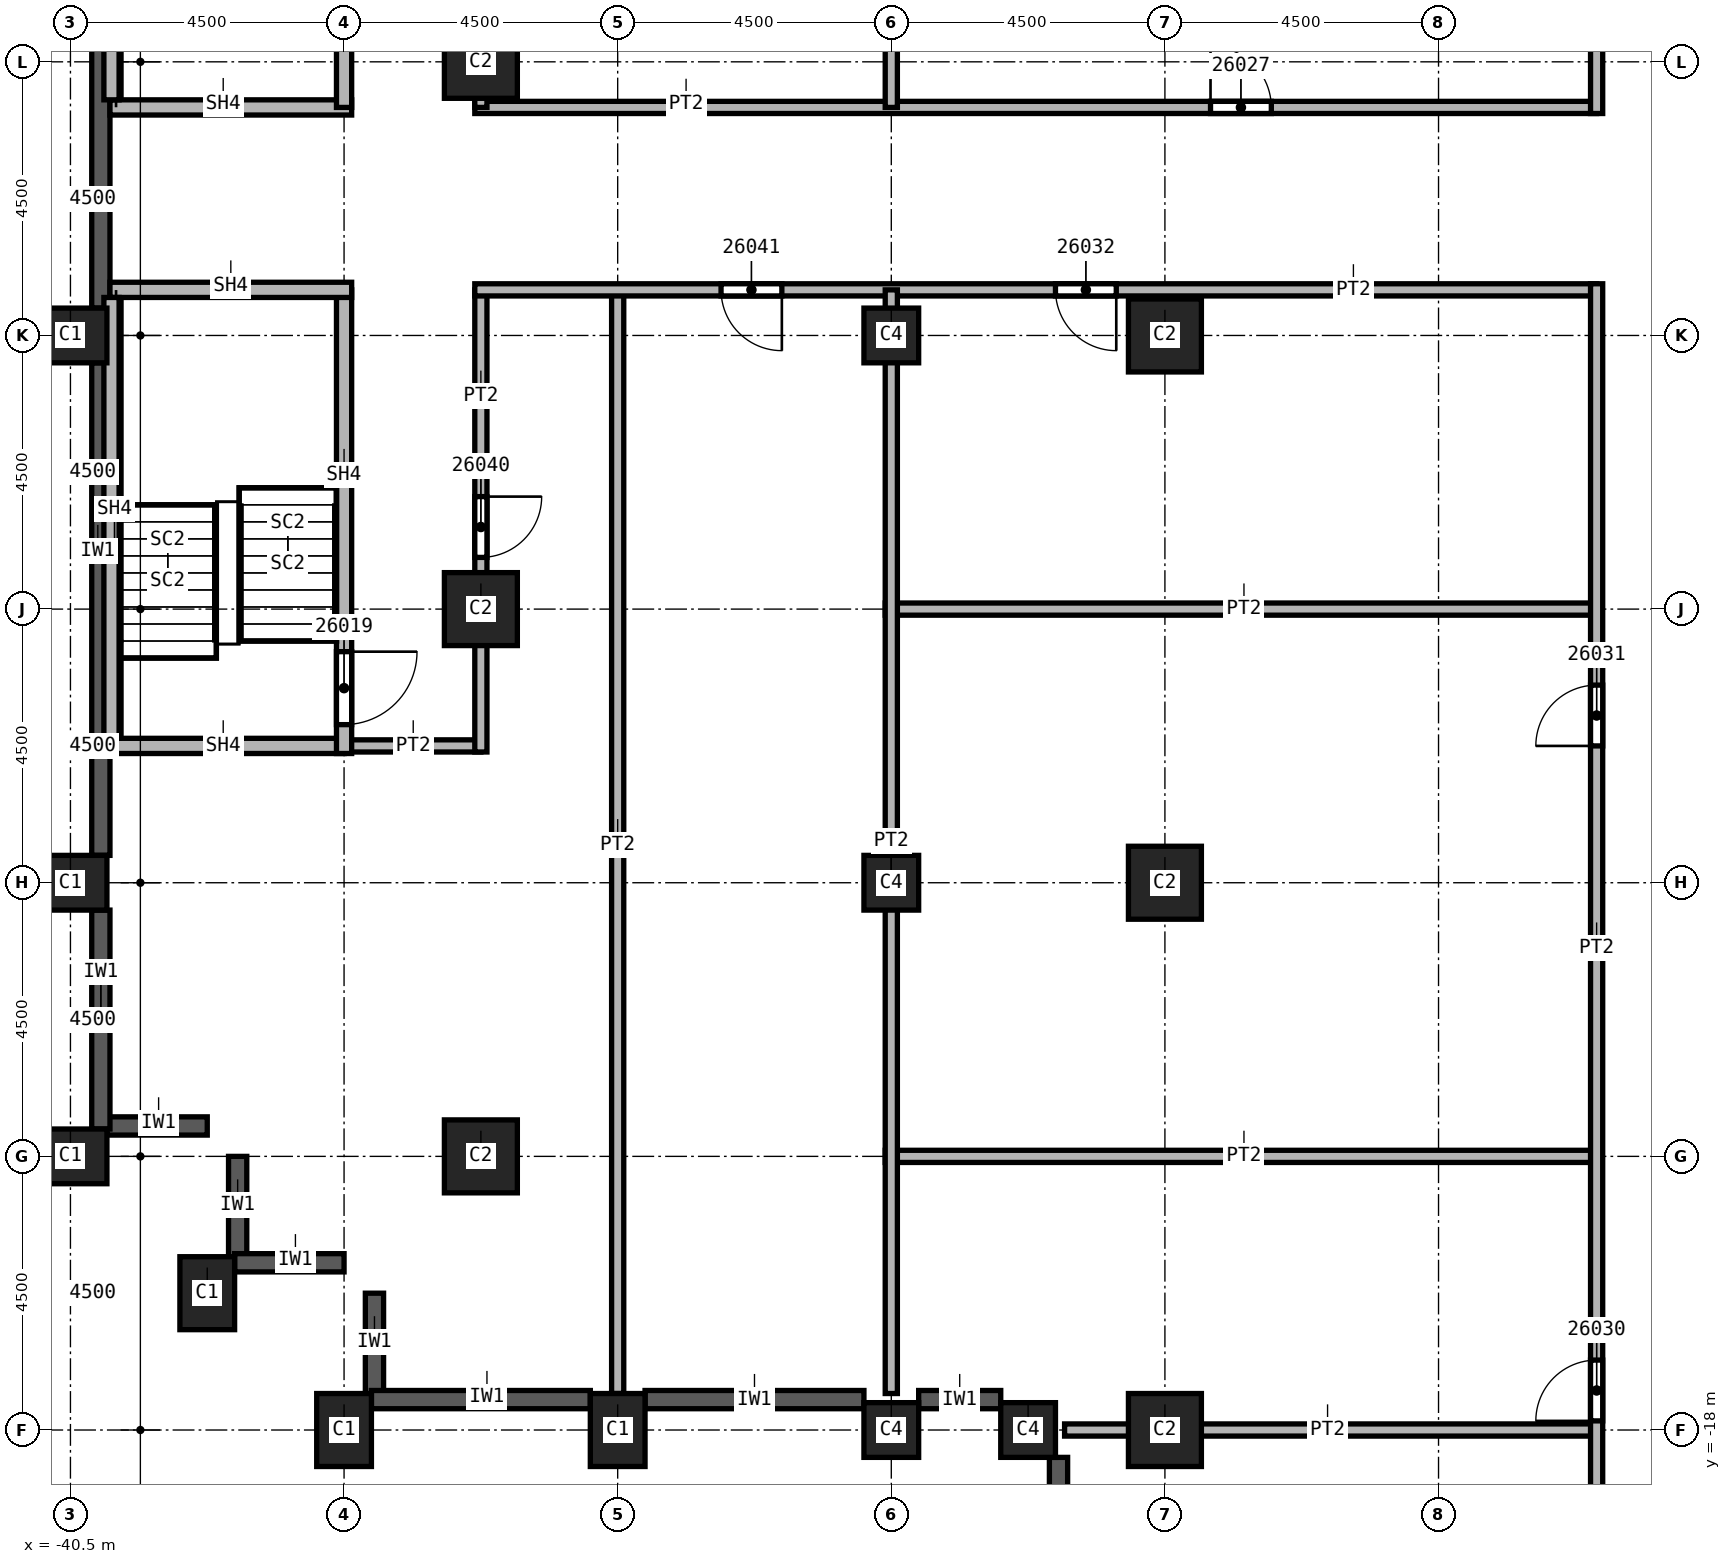
"""IFC4 building model, lengths in metres.
Left out: names, types, materials, properties, quantities, classifications, styles, units other than length and angle.
Written with IfcOpenShell. Run it as: python <this file> out.ifc"""

import sys

from ifc_helpers import new_model, si_unit, direction, frame, frame_2d, origin, origin_2d, place, context, subcontext, project, spatial, rectangle, extrude, element, fill, save


model = new_model("IFC4")
c1 = context("Model", 3, precision=1e-05, world=origin(), true_north=direction((0.0, 1.0)))
c2 = subcontext(c1, "Body", "Model", "MODEL_VIEW")
j1 = project(units=[si_unit("LENGTHUNIT", "METRE"), si_unit("PLANEANGLEUNIT", "RADIAN")], contexts=[c1])
p1 = place(None, origin())
s1 = spatial("IfcSite", under=j1, at=p1, CompositionType="ELEMENT")
p2 = place(p1, origin())
s2 = spatial("IfcBuilding", under=s1, at=p2, CompositionType="ELEMENT")
p3 = place(p2, frame((0.0, 0.0, 120.0)))
s3 = spatial("IfcBuildingStorey", under=s2, at=p3, CompositionType="ELEMENT", Elevation=120.0)
for number, where, z_axis, x_axis in (
    (1, (-40.5, 0.0, 0.0), (0.0, 0.0, 1.0), (0.0, 1.0, 0.0)),
    (2, (-40.5, -9.0, 0.0), (0.0, 0.0, 1.0), (0.0, 1.0, 0.0)),
    (3, (-40.5, -13.5, 0.0), (0.0, 0.0, 1.0), (0.0, 1.0, 0.0)),
    (4, (-38.25, -15.75, 0.0), (0.0, 0.0, 1.0), (1.0, 0.0, 0.0)),
    (5, (-31.5, -18.0, 0.0), (0.0, 0.0, 1.0), (1.0, 0.0, 0.0)),
    (6, (-36.0, -18.0, 0.0), (0.0, 0.0, 1.0), (1.0, 0.0, 0.0)),
):
    element("IfcColumn", number, at=place(p3, frame(where, z_axis=z_axis, x_axis=x_axis)), inside=s3, PredefinedType="COLUMN", context=c2, shape_type="SweptSolid", body=[
        extrude(rectangle(XDim=0.9, YDim=1.2, at=origin_2d()), origin(), (0.0, 0.0, 1.0), 5.7),
    ])
for number, where, z_axis, x_axis in (
    (7, (-33.75, 4.5, 0.0), (0.0, 0.0, 1.0), (1.0, 0.0, 0.0)),
    (8, (-33.75, -4.5, 0.0), (0.0, 0.0, 1.0), (1.0, 0.0, 0.0)),
    (9, (-33.75, -13.5, 0.0), (0.0, 0.0, 1.0), (1.0, 0.0, 0.0)),
    (10, (-22.5, 0.0, 0.0), (0.0, 0.0, 1.0), (1.0, 0.0, 0.0)),
    (11, (-22.5, -9.0, 0.0), (0.0, 0.0, 1.0), (1.0, 0.0, 0.0)),
    (12, (-22.5, -18.0, 0.0), (0.0, 0.0, 1.0), (1.0, 0.0, 0.0)),
):
    element("IfcColumn", number, at=place(p3, frame(where, z_axis=z_axis, x_axis=x_axis)), inside=s3, PredefinedType="COLUMN", context=c2, shape_type="SweptSolid", body=[
        extrude(rectangle(XDim=1.2, YDim=1.2, at=origin_2d()), origin(), (0.0, 0.0, 1.0), 5.7),
    ])
for number, where, z_axis, x_axis in (
    (13, (-27.0, 0.0, 0.0), (0.0, 0.0, 1.0), (1.0, 0.0, 0.0)),
    (14, (-27.0, -9.0, 0.0), (0.0, 0.0, 1.0), (1.0, 0.0, 0.0)),
    (15, (-27.0, -18.0, 0.0), (0.0, 0.0, 1.0), (1.0, 0.0, 0.0)),
    (16, (-24.75, -18.0, 0.0), (0.0, 0.0, 1.0), (1.0, 0.0, 0.0)),
):
    element("IfcColumn", number, at=place(p3, frame(where, z_axis=z_axis, x_axis=x_axis)), inside=s3, PredefinedType="COLUMN", context=c2, shape_type="SweptSolid", body=[
        extrude(rectangle(XDim=0.9, YDim=0.9, at=origin_2d()), origin(), (0.0, 0.0, 1.0), 5.7),
    ])
p4 = place(p3, frame((-39.9, -13.0, 0.0), z_axis=(0.0, 0.0, 1.0), x_axis=(1.0, 0.0, 0.0)))
e17 = element("IfcWall", 17, at=p4, inside=s3, PredefinedType="SOLIDWALL", context=c2, shape_type="SweptSolid", body=[
    extrude(rectangle(XDim=1.65, YDim=0.3, at=frame_2d((0.825, 0.0))), origin(), (0.0, 0.0, 1.0), 5.1),
])
for number, where, z_axis, x_axis in (
    (18, (-37.75, -15.3, 0.0), (0.0, 0.0, 1.0), (0.0, 1.0, 0.0)),
    (19, (-37.8, -15.25, 0.0), (0.0, 0.0, 1.0), (1.0, 0.0, 0.0)),
    (20, (-35.5, -17.55, 0.0), (0.0, 0.0, 1.0), (0.0, 1.0, 0.0)),
):
    element("IfcWall", number, at=place(p3, frame(where, z_axis=z_axis, x_axis=x_axis)), inside=s3, PredefinedType="SOLIDWALL", context=c2, shape_type="SweptSolid", body=[
        extrude(rectangle(XDim=1.8, YDim=0.3, at=frame_2d((0.9, 0.0))), origin(), (0.0, 0.0, 1.0), 5.1),
    ])
for number, where, z_axis, x_axis in (
    (21, (-40.0, 8.55, 0.0), (0.0, 0.0, 1.0), (0.0, -1.0, 0.0)),
    (22, (-40.0, -0.45, 0.0), (0.0, 0.0, 1.0), (0.0, -1.0, 0.0)),
):
    element("IfcWall", number, at=place(p3, frame(where, z_axis=z_axis, x_axis=x_axis)), inside=s3, PredefinedType="SOLIDWALL", context=c2, shape_type="SweptSolid", body=[
        extrude(rectangle(XDim=8.1, YDim=0.3, at=frame_2d((4.05, 0.0))), origin(), (0.0, 0.0, 1.0), 5.1),
    ])
for number, where, z_axis, x_axis in (
    (23, (-40.0, -9.45, 0.0), (0.0, 0.0, 1.0), (0.0, -1.0, 0.0)),
    (24, (-35.55, -17.5, 0.0), (0.0, 0.0, 1.0), (1.0, 0.0, 0.0)),
    (25, (-31.05, -17.5, 0.0), (0.0, 0.0, 1.0), (1.0, 0.0, 0.0)),
):
    element("IfcWall", number, at=place(p3, frame(where, z_axis=z_axis, x_axis=x_axis)), inside=s3, PredefinedType="SOLIDWALL", context=c2, shape_type="SweptSolid", body=[
        extrude(rectangle(XDim=3.6, YDim=0.3, at=frame_2d((1.8, 0.0))), origin(), (0.0, 0.0, 1.0), 5.1),
    ])
p5 = place(p3, frame((-26.55, -17.5, 0.0), z_axis=(0.0, 0.0, 1.0), x_axis=(1.0, 0.0, 0.0)))
e26 = element("IfcWall", 26, at=p5, inside=s3, PredefinedType="SOLIDWALL", context=c2, shape_type="SweptSolid", body=[
    extrude(rectangle(XDim=1.35, YDim=0.3, at=frame_2d((0.675, 0.0))), origin(), (0.0, 0.0, 1.0), 5.1),
])
p6 = place(p3, frame((-24.25, -18.45, 0.0), z_axis=(0.0, 0.0, 1.0), x_axis=(0.0, -1.0, 0.0)))
e27 = element("IfcWall", 27, at=p6, inside=s3, PredefinedType="SOLIDWALL", context=c2, shape_type="SweptSolid", body=[
    extrude(rectangle(XDim=2.5, YDim=0.3, at=frame_2d((1.25, 0.0))), origin(), (0.0, 0.0, 1.0), 5.1),
])
p7 = place(p3, frame((-33.85, 3.75, 0.0), z_axis=(0.0, 0.0, 1.0), x_axis=(1.0, 0.0, 0.0)))
e28 = element("IfcWall", 28, at=p7, inside=s3, PredefinedType="PARTITIONING", context=c2, shape_type="SweptSolid", body=[
    extrude(rectangle(XDim=18.45, YDim=0.2, at=frame_2d((9.225, 0.0))), origin(), (0.0, 0.0, 1.0), 5.7),
])
p8 = place(p7, frame((12.1, 0.0, 0.0)))
e29 = element("IfcOpeningElement", 29, at=p8, cuts=e28, PredefinedType="OPENING", context=c2, shape_type="SweptSolid", body=[
    extrude(rectangle(XDim=1.0, YDim=2.1, at=frame_2d((0.5, 1.05))), frame((0.0, 0.1, 0.0), z_axis=(0.0, -1.0, 0.0), x_axis=(1.0, 0.0, 0.0)), (0.0, 0.0, 1.0), 0.2),
])
p9 = place(p3, frame((-33.75, -6.75, 0.0), z_axis=(0.0, 0.0, 1.0), x_axis=(-1.0, 0.0, 0.0)))
e30 = element("IfcWall", 30, at=p9, inside=s3, PredefinedType="PARTITIONING", context=c2, shape_type="SweptSolid", body=[
    extrude(rectangle(XDim=2.25, YDim=0.2, at=frame_2d((1.125, 0.0))), origin(), (0.0, 0.0, 1.0), 5.7),
])
p10 = place(p3, frame((-33.75, 0.75, 0.0), z_axis=(0.0, 0.0, 1.0), x_axis=(0.0, -1.0, 0.0)))
e31 = element("IfcWall", 31, at=p10, inside=s3, PredefinedType="PARTITIONING", context=c2, shape_type="SweptSolid", body=[
    extrude(rectangle(XDim=7.6, YDim=0.2, at=frame_2d((3.8, 0.0))), origin(), (0.0, 0.0, 1.0), 5.7),
])
p11 = place(p10, frame((3.4, 0.0, 0.0)))
e32 = element("IfcOpeningElement", 32, at=p11, cuts=e31, PredefinedType="OPENING", context=c2, shape_type="SweptSolid", body=[
    extrude(rectangle(XDim=1.0, YDim=2.1, at=frame_2d((0.5, 1.05))), frame((0.0, 0.1, 0.0), z_axis=(0.0, -1.0, 0.0), x_axis=(1.0, 0.0, 0.0)), (0.0, 0.0, 1.0), 0.2),
])
p12 = place(p3, frame((-33.75, 11.25, 0.0), z_axis=(0.0, 0.0, 1.0), x_axis=(0.0, -1.0, 0.0)))
e33 = element("IfcWall", 33, at=p12, inside=s3, PredefinedType="PARTITIONING", context=c2, shape_type="SweptSolid", body=[
    extrude(rectangle(XDim=7.5, YDim=0.2, at=frame_2d((3.75, 0.0))), origin(), (0.0, 0.0, 1.0), 5.7),
])
p13 = place(p3, frame((-31.5, 0.75, 0.0), z_axis=(0.0, 0.0, 1.0), x_axis=(0.0, -1.0, 0.0)))
e34 = element("IfcWall", 34, at=p13, inside=s3, PredefinedType="PARTITIONING", context=c2, shape_type="SweptSolid", body=[
    extrude(rectangle(XDim=18.15, YDim=0.2, at=frame_2d((9.075, 0.0))), origin(), (0.0, 0.0, 1.0), 5.7),
])
p14 = place(p3, frame((-15.4, 0.75, 0.0), z_axis=(0.0, 0.0, 1.0), x_axis=(-1.0, 0.0, 0.0)))
e35 = element("IfcWall", 35, at=p14, inside=s3, PredefinedType="PARTITIONING", context=c2, shape_type="SweptSolid", body=[
    extrude(rectangle(XDim=18.45, YDim=0.2, at=frame_2d((9.225, 0.0))), origin(), (0.0, 0.0, 1.0), 5.7),
])
p15 = place(p14, frame((7.9, 0.0, 0.0)))
e36 = element("IfcOpeningElement", 36, at=p15, cuts=e35, PredefinedType="OPENING", context=c2, shape_type="SweptSolid", body=[
    extrude(rectangle(XDim=1.0, YDim=2.1, at=frame_2d((0.5, 1.05))), frame((0.0, 0.1, 0.0), z_axis=(0.0, -1.0, 0.0), x_axis=(1.0, 0.0, 0.0)), (0.0, 0.0, 1.0), 0.2),
])
p16 = place(p14, frame((13.4, 0.0, 0.0)))
e37 = element("IfcOpeningElement", 37, at=p16, cuts=e35, PredefinedType="OPENING", context=c2, shape_type="SweptSolid", body=[
    extrude(rectangle(XDim=1.0, YDim=2.1, at=frame_2d((0.5, 1.05))), frame((0.0, 0.1, 0.0), z_axis=(0.0, -1.0, 0.0), x_axis=(1.0, 0.0, 0.0)), (0.0, 0.0, 1.0), 0.2),
])
for number, where, z_axis, x_axis in (
    (38, (-27.1, -13.5, 0.0), (0.0, 0.0, 1.0), (1.0, 0.0, 0.0)),
    (39, (-27.1, -4.5, 0.0), (0.0, 0.0, 1.0), (1.0, 0.0, 0.0)),
):
    element("IfcWall", number, at=place(p3, frame(where, z_axis=z_axis, x_axis=x_axis)), inside=s3, PredefinedType="PARTITIONING", context=c2, shape_type="SweptSolid", body=[
        extrude(rectangle(XDim=11.7, YDim=0.2, at=frame_2d((5.85, 0.0))), origin(), (0.0, 0.0, 1.0), 5.7),
    ])
p17 = place(p3, frame((-27.0, -17.4, 0.0), z_axis=(0.0, 0.0, 1.0), x_axis=(0.0, 1.0, 0.0)))
e40 = element("IfcWall", 40, at=p17, inside=s3, PredefinedType="PARTITIONING", context=c2, shape_type="SweptSolid", body=[
    extrude(rectangle(XDim=18.15, YDim=0.2, at=frame_2d((9.075, 0.0))), origin(), (0.0, 0.0, 1.0), 5.7),
])
p18 = place(p3, frame((-27.0, 3.75, 0.0), z_axis=(0.0, 0.0, 1.0), x_axis=(0.0, 1.0, 0.0)))
e41 = element("IfcWall", 41, at=p18, inside=s3, PredefinedType="PARTITIONING", context=c2, shape_type="SweptSolid", body=[
    extrude(rectangle(XDim=13.65, YDim=0.2, at=frame_2d((6.825, 0.0))), origin(), (0.0, 0.0, 1.0), 5.7),
])
p19 = place(p3, frame((-24.15, -18.0, 0.0), z_axis=(0.0, 0.0, 1.0), x_axis=(1.0, 0.0, 0.0)))
e42 = element("IfcWall", 42, at=p19, inside=s3, PredefinedType="PARTITIONING", context=c2, shape_type="SweptSolid", body=[
    extrude(rectangle(XDim=8.75, YDim=0.2, at=frame_2d((4.375, 0.0))), origin(), (0.0, 0.0, 1.0), 5.7),
])
p20 = place(p3, frame((-15.4, -24.15, 0.0), z_axis=(0.0, 0.0, 1.0), x_axis=(0.0, 1.0, 0.0)))
e43 = element("IfcWall", 43, at=p20, inside=s3, PredefinedType="PARTITIONING", context=c2, shape_type="SweptSolid", body=[
    extrude(rectangle(XDim=25.0, YDim=0.2, at=frame_2d((12.5, 0.0))), origin(), (0.0, 0.0, 1.0), 5.7),
])
p21 = place(p20, frame((0.85, 0.0, 0.0)))
e44 = element("IfcOpeningElement", 44, at=p21, cuts=e43, PredefinedType="OPENING", context=c2, shape_type="SweptSolid", body=[
    extrude(rectangle(XDim=1.0, YDim=2.1, at=frame_2d((0.5, 1.05))), frame((0.0, 0.1, 0.0), z_axis=(0.0, -1.0, 0.0), x_axis=(1.0, 0.0, 0.0)), (0.0, 0.0, 1.0), 0.2),
])
p22 = place(p20, frame((6.3, 0.0, 0.0)))
e45 = element("IfcOpeningElement", 45, at=p22, cuts=e43, PredefinedType="OPENING", context=c2, shape_type="SweptSolid", body=[
    extrude(rectangle(XDim=1.0, YDim=2.1, at=frame_2d((0.5, 1.05))), frame((0.0, 0.1, 0.0), z_axis=(0.0, -1.0, 0.0), x_axis=(1.0, 0.0, 0.0)), (0.0, 0.0, 1.0), 0.2),
])
p23 = place(p20, frame((17.4, 0.0, 0.0)))
e46 = element("IfcOpeningElement", 46, at=p23, cuts=e43, PredefinedType="OPENING", context=c2, shape_type="SweptSolid", body=[
    extrude(rectangle(XDim=1.0, YDim=2.1, at=frame_2d((0.5, 1.05))), frame((0.0, 0.1, 0.0), z_axis=(0.0, -1.0, 0.0), x_axis=(1.0, 0.0, 0.0)), (0.0, 0.0, 1.0), 0.2),
])
p24 = place(p3, frame((-15.4, 3.65, 0.0), z_axis=(0.0, 0.0, 1.0), x_axis=(0.0, 1.0, 0.0)))
e47 = element("IfcWall", 47, at=p24, inside=s3, PredefinedType="PARTITIONING", context=c2, shape_type="SweptSolid", body=[
    extrude(rectangle(XDim=9.95, YDim=0.2, at=frame_2d((4.975, 0.0))), origin(), (0.0, 0.0, 1.0), 5.7),
])
p25 = place(p3, frame((-39.85, 3.75, 0.0), z_axis=(0.0, 0.0, 1.0), x_axis=(1.0, 0.0, 0.0)))
e48 = element("IfcWall", 48, at=p25, inside=s3, PredefinedType="SOLIDWALL", context=c2, shape_type="SweptSolid", body=[
    extrude(rectangle(XDim=3.975, YDim=0.25, at=frame_2d((1.988, 0.0))), origin(), (0.0, 0.0, 1.0), 5.7),
])
p26 = place(p3, frame((-36.0, -6.75, 0.0), z_axis=(0.0, 0.0, 1.0), x_axis=(-1.0, 0.0, 0.0)))
e49 = element("IfcWall", 49, at=p26, inside=s3, PredefinedType="SOLIDWALL", context=c2, shape_type="SweptSolid", body=[
    extrude(rectangle(XDim=3.85, YDim=0.25, at=frame_2d((1.925, 0.0))), origin(), (0.0, 0.0, 1.0), 5.7),
])
p27 = place(p3, frame((-36.0, 0.75, 0.0), z_axis=(0.0, 0.0, 1.0), x_axis=(0.0, -1.0, 0.0)))
e50 = element("IfcWall", 50, at=p27, inside=s3, PredefinedType="SOLIDWALL", context=c2, shape_type="SweptSolid", body=[
    extrude(rectangle(XDim=7.625, YDim=0.25, at=frame_2d((3.812, 0.0))), origin(), (0.0, 0.0, 1.0), 5.7),
])
p28 = place(p27, frame((5.95, 0.0, 0.0)))
e51 = element("IfcOpeningElement", 51, at=p28, cuts=e50, PredefinedType="OPENING", context=c2, shape_type="SweptSolid", body=[
    extrude(rectangle(XDim=1.2, YDim=2.1, at=frame_2d((0.6, 1.05))), frame((0.0, 0.125, 0.0), z_axis=(0.0, -1.0, 0.0), x_axis=(1.0, 0.0, 0.0)), (0.0, 0.0, 1.0), 0.25),
])
p29 = place(p3, frame((-36.0, 11.375, 0.0), z_axis=(0.0, 0.0, 1.0), x_axis=(0.0, -1.0, 0.0)))
e52 = element("IfcWall", 52, at=p29, inside=s3, PredefinedType="SOLIDWALL", context=c2, shape_type="SweptSolid", body=[
    extrude(rectangle(XDim=7.625, YDim=0.25, at=frame_2d((3.812, 0.0))), origin(), (0.0, 0.0, 1.0), 5.7),
])
p30 = place(p29, frame((0.4, 0.0, 0.0)))
e53 = element("IfcOpeningElement", 53, at=p30, cuts=e52, PredefinedType="OPENING", context=c2, shape_type="SweptSolid", body=[
    extrude(rectangle(XDim=1.2, YDim=2.1, at=frame_2d((0.6, 1.05))), frame((0.0, 0.125, 0.0), z_axis=(0.0, -1.0, 0.0), x_axis=(1.0, 0.0, 0.0)), (0.0, 0.0, 1.0), 0.25),
])
p31 = place(p3, frame((-35.875, 0.75, 0.0), z_axis=(0.0, 0.0, 1.0), x_axis=(-1.0, 0.0, 0.0)))
e54 = element("IfcWall", 54, at=p31, inside=s3, PredefinedType="SOLIDWALL", context=c2, shape_type="SweptSolid", body=[
    extrude(rectangle(XDim=3.975, YDim=0.25, at=frame_2d((1.988, 0.0))), origin(), (0.0, 0.0, 1.0), 5.7),
])
for number, where, z_axis, x_axis in (
    (55, (-39.825, 3.875, 0.0), (0.0, 0.0, 1.0), (0.0, 1.0, 0.0)),
    (56, (-39.825, -6.625, 0.0), (0.0, 0.0, 1.0), (0.0, 1.0, 0.0)),
):
    element("IfcWall", number, at=place(p3, frame(where, z_axis=z_axis, x_axis=x_axis)), inside=s3, PredefinedType="SOLIDWALL", context=c2, shape_type="SweptSolid", body=[
        extrude(rectangle(XDim=7.25, YDim=0.25, at=frame_2d((3.625, 0.0))), origin(), (0.0, 0.0, 1.0), 5.7),
    ])
p32 = place(p28, origin())
e57 = element("IfcDoor", 57, at=p32, inside=s3, OperationType="SINGLE_SWING_RIGHT", PredefinedType="DOOR", context=c2, shape_type="SweptSolid", body=[
    extrude(rectangle(XDim=1.2, YDim=2.1, at=frame_2d((0.6, 1.05))), frame((0.0, 0.025, 0.0), z_axis=(0.0, -1.0, 0.0), x_axis=(1.0, 0.0, 0.0)), (0.0, 0.0, 1.0), 0.05),
])
fill(e51, e57)
p33 = place(p8, origin())
e58 = element("IfcDoor", 58, at=p33, inside=s3, OperationType="SINGLE_SWING_RIGHT", PredefinedType="DOOR", context=c2, shape_type="SweptSolid", body=[
    extrude(rectangle(XDim=1.0, YDim=2.1, at=frame_2d((0.5, 1.05))), frame((0.0, 0.025, 0.0), z_axis=(0.0, -1.0, 0.0), x_axis=(1.0, 0.0, 0.0)), (0.0, 0.0, 1.0), 0.05),
])
fill(e29, e58)
p34 = place(p22, origin())
e59 = element("IfcDoor", 59, at=p34, inside=s3, OperationType="SINGLE_SWING_LEFT", PredefinedType="DOOR", context=c2, shape_type="SweptSolid", body=[
    extrude(rectangle(XDim=1.0, YDim=2.1, at=frame_2d((0.5, 1.05))), frame((0.0, 0.025, 0.0), z_axis=(0.0, -1.0, 0.0), x_axis=(1.0, 0.0, 0.0)), (0.0, 0.0, 1.0), 0.05),
])
fill(e45, e59)
p35 = place(p23, origin())
e60 = element("IfcDoor", 60, at=p35, inside=s3, OperationType="SINGLE_SWING_RIGHT", PredefinedType="DOOR", context=c2, shape_type="SweptSolid", body=[
    extrude(rectangle(XDim=1.0, YDim=2.1, at=frame_2d((0.5, 1.05))), frame((0.0, 0.025, 0.0), z_axis=(0.0, -1.0, 0.0), x_axis=(1.0, 0.0, 0.0)), (0.0, 0.0, 1.0), 0.05),
])
fill(e46, e60)
p36 = place(p15, origin())
e61 = element("IfcDoor", 61, at=p36, inside=s3, OperationType="SINGLE_SWING_LEFT", PredefinedType="DOOR", context=c2, shape_type="SweptSolid", body=[
    extrude(rectangle(XDim=1.0, YDim=2.1, at=frame_2d((0.5, 1.05))), frame((0.0, 0.025, 0.0), z_axis=(0.0, -1.0, 0.0), x_axis=(1.0, 0.0, 0.0)), (0.0, 0.0, 1.0), 0.05),
])
fill(e36, e61)
p37 = place(p11, origin())
e62 = element("IfcDoor", 62, at=p37, inside=s3, OperationType="SINGLE_SWING_LEFT", PredefinedType="DOOR", context=c2, shape_type="SweptSolid", body=[
    extrude(rectangle(XDim=1.0, YDim=2.1, at=frame_2d((0.5, 1.05))), frame((0.0, 0.025, 0.0), z_axis=(0.0, -1.0, 0.0), x_axis=(1.0, 0.0, 0.0)), (0.0, 0.0, 1.0), 0.05),
])
fill(e32, e62)
p38 = place(p16, origin())
e63 = element("IfcDoor", 63, at=p38, inside=s3, OperationType="SINGLE_SWING_RIGHT", PredefinedType="DOOR", context=c2, shape_type="SweptSolid", body=[
    extrude(rectangle(XDim=1.0, YDim=2.1, at=frame_2d((0.5, 1.05))), frame((0.0, 0.025, 0.0), z_axis=(0.0, -1.0, 0.0), x_axis=(1.0, 0.0, 0.0)), (0.0, 0.0, 1.0), 0.05),
])
fill(e37, e63)
save(model, sys.argv[1])
